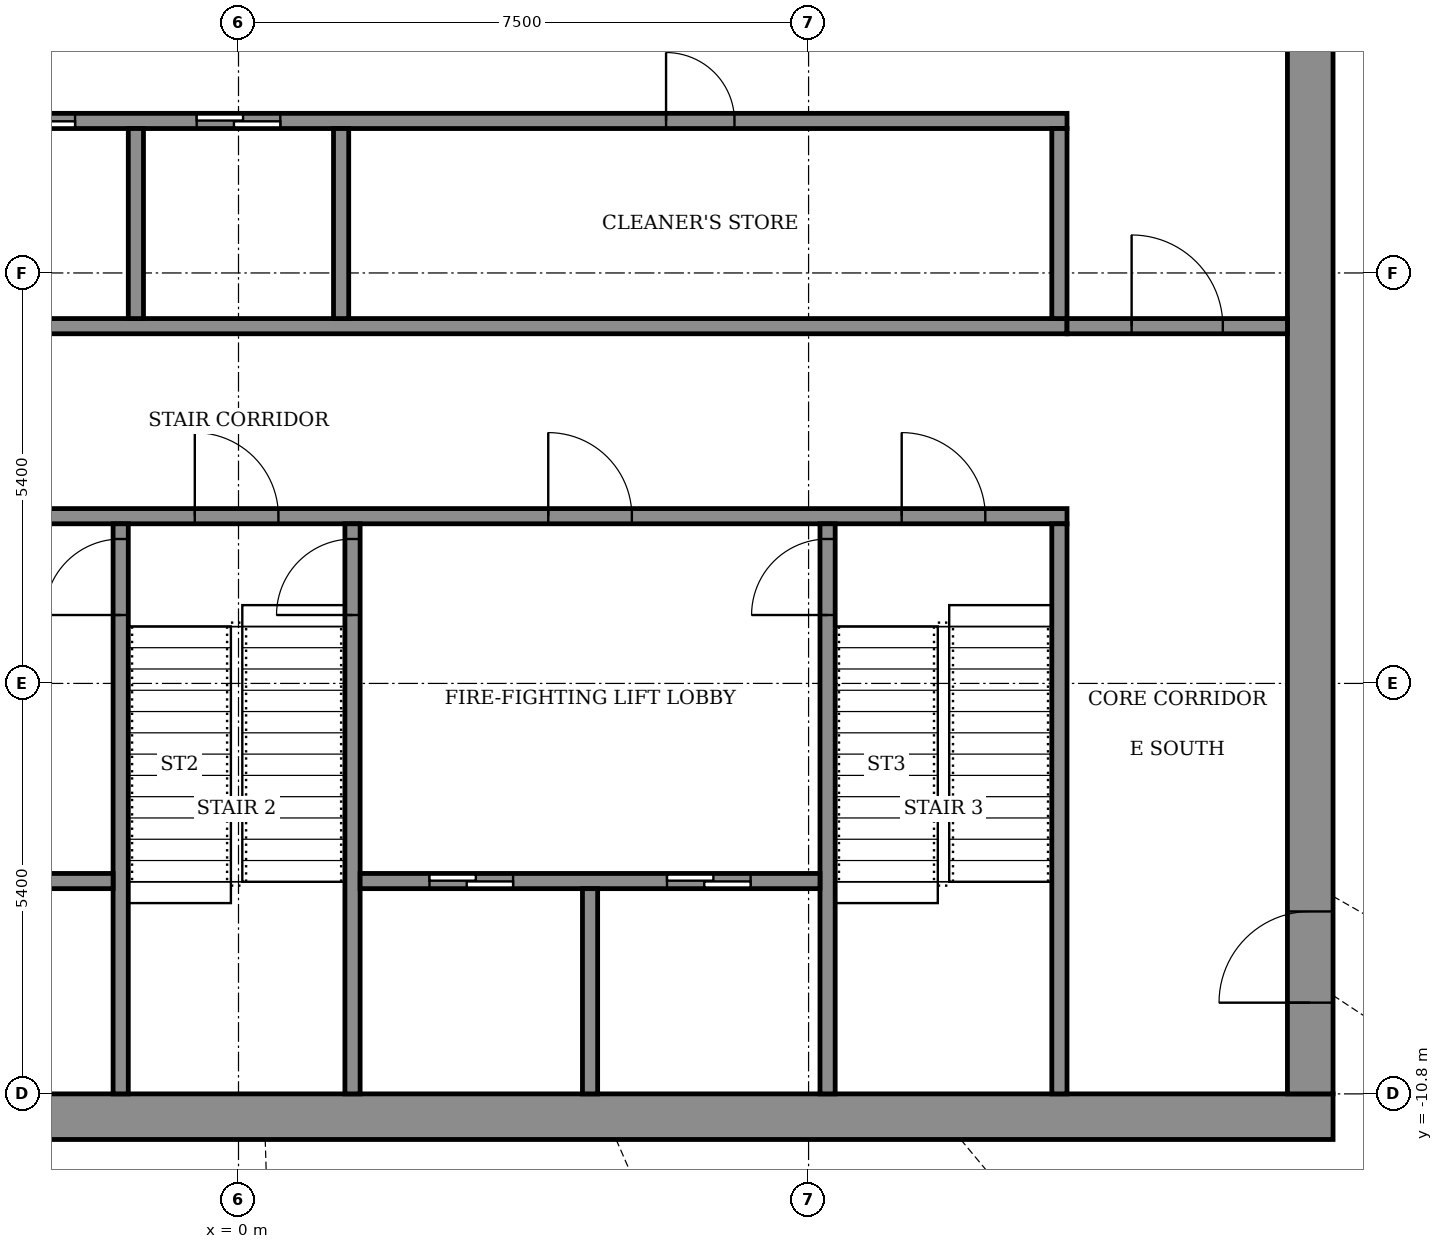
"""IFC4 building model, lengths in metres.
Left out: names, types, materials, properties, quantities, classifications, styles, units other than length and angle.
Written with IfcOpenShell. Run it as: python <this file> out.ifc"""

import sys

from ifc_helpers import new_model, si_unit, direction, frame, frame_2d, origin, place, context, subcontext, project, spatial, rectangle, extrude, element, fill, save


model = new_model("IFC4")
c1 = context("Model", 3, precision=1e-05, world=origin(), true_north=direction((0.0, 1.0)))
c2 = subcontext(c1, "Body", "Model", "MODEL_VIEW")
j1 = project(units=[si_unit("LENGTHUNIT", "METRE"), si_unit("PLANEANGLEUNIT", "RADIAN")], contexts=[c1])
p1 = place(None, origin())
s1 = spatial("IfcSite", under=j1, at=p1, CompositionType="ELEMENT")
p2 = place(p1, origin())
s2 = spatial("IfcBuilding", under=s1, at=p2, CompositionType="ELEMENT")
p3 = place(p2, frame((0.0, 0.0, 337.9)))
s3 = spatial("IfcBuildingStorey", under=s2, at=p3, CompositionType="ELEMENT", Elevation=337.9)
p4 = place(p3, frame((-14.4, -11.1, 0.0), z_axis=(0.0, 0.0, 1.0), x_axis=(1.0, 0.0, 0.0)))
e1 = element("IfcWall", 1, at=p4, inside=s3, PredefinedType="SHEAR", context=c2, shape_type="SweptSolid", body=[
    extrude(rectangle(XDim=28.8, YDim=0.6, at=frame_2d((14.4, 0.0))), origin(), (0.0, 0.0, 1.0), 4.6),
])
p5 = place(p3, frame((14.1, -10.8, 0.0), z_axis=(0.0, 0.0, 1.0), x_axis=(0.0, 1.0, 0.0)))
e2 = element("IfcWall", 2, at=p5, inside=s3, PredefinedType="SHEAR", context=c2, shape_type="SweptSolid", body=[
    extrude(rectangle(XDim=21.6, YDim=0.6, at=frame_2d((10.8, 0.0))), origin(), (0.0, 0.0, 1.0), 4.6),
])
p6 = place(p5, frame((1.2, 0.0, 0.0)))
e3 = element("IfcOpeningElement", 3, at=p6, cuts=e2, PredefinedType="OPENING", context=c2, shape_type="SweptSolid", body=[
    extrude(rectangle(XDim=1.2, YDim=2.1, at=frame_2d((0.6, 1.05))), frame((0.0, 0.31, 0.0), z_axis=(0.0, -1.0, 0.0), x_axis=(1.0, 0.0, 0.0)), (0.0, 0.0, 1.0), 0.62),
])
p7 = place(p3, frame((-10.9, -3.2, 0.0), z_axis=(0.0, 0.0, 1.0), x_axis=(1.0, 0.0, 0.0)))
e4 = element("IfcWall", 4, at=p7, inside=s3, PredefinedType="SHEAR", context=c2, shape_type="SweptSolid", body=[
    extrude(rectangle(XDim=21.8, YDim=0.2, at=frame_2d((10.9, 0.0))), origin(), (0.0, 0.0, 1.0), 4.05),
])
p8 = place(p7, frame((1.075, 0.0, 0.0)))
e5 = element("IfcOpeningElement", 5, at=p8, cuts=e4, PredefinedType="OPENING", context=c2, shape_type="SweptSolid", body=[
    extrude(rectangle(XDim=1.1, YDim=2.1, at=frame_2d((0.55, 1.05))), frame((0.0, 0.11, 0.0), z_axis=(0.0, -1.0, 0.0), x_axis=(1.0, 0.0, 0.0)), (0.0, 0.0, 1.0), 0.22),
])
p9 = place(p7, frame((10.325, 0.0, 0.0)))
e6 = element("IfcOpeningElement", 6, at=p9, cuts=e4, PredefinedType="OPENING", context=c2, shape_type="SweptSolid", body=[
    extrude(rectangle(XDim=1.1, YDim=2.1, at=frame_2d((0.55, 1.05))), frame((0.0, 0.11, 0.0), z_axis=(0.0, -1.0, 0.0), x_axis=(1.0, 0.0, 0.0)), (0.0, 0.0, 1.0), 0.22),
])
p10 = place(p7, frame((19.625, 0.0, 0.0)))
e7 = element("IfcOpeningElement", 7, at=p10, cuts=e4, PredefinedType="OPENING", context=c2, shape_type="SweptSolid", body=[
    extrude(rectangle(XDim=1.1, YDim=2.1, at=frame_2d((0.55, 1.05))), frame((0.0, 0.11, 0.0), z_axis=(0.0, -1.0, 0.0), x_axis=(1.0, 0.0, 0.0)), (0.0, 0.0, 1.0), 0.22),
])
p11 = place(p7, frame((5.7, 0.0, 0.0)))
e8 = element("IfcOpeningElement", 8, at=p11, cuts=e4, PredefinedType="OPENING", context=c2, shape_type="SweptSolid", body=[
    extrude(rectangle(XDim=1.1, YDim=2.1, at=frame_2d((0.55, 1.05))), frame((0.0, 0.11, 0.0), z_axis=(0.0, -1.0, 0.0), x_axis=(1.0, 0.0, 0.0)), (0.0, 0.0, 1.0), 0.22),
])
p12 = place(p7, frame((14.975, 0.0, 0.0)))
e9 = element("IfcOpeningElement", 9, at=p12, cuts=e4, PredefinedType="OPENING", context=c2, shape_type="SweptSolid", body=[
    extrude(rectangle(XDim=1.1, YDim=2.1, at=frame_2d((0.55, 1.05))), frame((0.0, 0.11, 0.0), z_axis=(0.0, -1.0, 0.0), x_axis=(1.0, 0.0, 0.0)), (0.0, 0.0, 1.0), 0.22),
])
p13 = place(p3, frame((-10.9, -0.7, 0.0), z_axis=(0.0, 0.0, 1.0), x_axis=(1.0, 0.0, 0.0)))
e10 = element("IfcWall", 10, at=p13, inside=s3, PredefinedType="SHEAR", context=c2, shape_type="SweptSolid", body=[
    extrude(rectangle(XDim=21.8, YDim=0.2, at=frame_2d((10.9, 0.0))), origin(), (0.0, 0.0, 1.0), 4.05),
])
p14 = place(p3, frame((-10.9, 2.0, 0.0), z_axis=(0.0, 0.0, 1.0), x_axis=(1.0, 0.0, 0.0)))
e11 = element("IfcWall", 11, at=p14, inside=s3, PredefinedType="SHEAR", context=c2, shape_type="SweptSolid", body=[
    extrude(rectangle(XDim=21.8, YDim=0.2, at=frame_2d((10.9, 0.0))), origin(), (0.0, 0.0, 1.0), 4.05),
])
p15 = place(p14, frame((4.95, 0.0, 0.0)))
e12 = element("IfcOpeningElement", 12, at=p15, cuts=e11, PredefinedType="OPENING", context=c2, shape_type="SweptSolid", body=[
    extrude(rectangle(XDim=1.1, YDim=2.1, at=frame_2d((0.55, 1.05))), frame((0.0, 0.11, 0.0), z_axis=(0.0, -1.0, 0.0), x_axis=(1.0, 0.0, 0.0)), (0.0, 0.0, 1.0), 0.22),
])
p16 = place(p14, frame((7.65, 0.0, 0.0)))
e13 = element("IfcOpeningElement", 13, at=p16, cuts=e11, PredefinedType="OPENING", context=c2, shape_type="SweptSolid", body=[
    extrude(rectangle(XDim=1.1, YDim=2.1, at=frame_2d((0.55, 1.05))), frame((0.0, 0.11, 0.0), z_axis=(0.0, -1.0, 0.0), x_axis=(1.0, 0.0, 0.0)), (0.0, 0.0, 1.0), 0.22),
])
p17 = place(p14, frame((10.35, 0.0, 0.0)))
e14 = element("IfcOpeningElement", 14, at=p17, cuts=e11, PredefinedType="OPENING", context=c2, shape_type="SweptSolid", body=[
    extrude(rectangle(XDim=1.1, YDim=2.1, at=frame_2d((0.55, 1.05))), frame((0.0, 0.11, 0.0), z_axis=(0.0, -1.0, 0.0), x_axis=(1.0, 0.0, 0.0)), (0.0, 0.0, 1.0), 0.22),
])
p18 = place(p14, frame((1.675, 0.0, 0.0)))
e15 = element("IfcOpeningElement", 15, at=p18, cuts=e11, PredefinedType="OPENING", context=c2, shape_type="SweptSolid", body=[
    extrude(rectangle(XDim=0.9, YDim=2.1, at=frame_2d((0.45, 1.05))), frame((0.0, 0.11, 0.0), z_axis=(0.0, -1.0, 0.0), x_axis=(1.0, 0.0, 0.0)), (0.0, 0.0, 1.0), 0.22),
])
p19 = place(p14, frame((16.525, 0.0, 0.0)))
e16 = element("IfcOpeningElement", 16, at=p19, cuts=e11, PredefinedType="OPENING", context=c2, shape_type="SweptSolid", body=[
    extrude(rectangle(XDim=0.9, YDim=2.1, at=frame_2d((0.45, 1.05))), frame((0.0, 0.11, 0.0), z_axis=(0.0, -1.0, 0.0), x_axis=(1.0, 0.0, 0.0)), (0.0, 0.0, 1.0), 0.22),
])
p20 = place(p3, frame((-1.55, -10.8, 0.0), z_axis=(0.0, 0.0, 1.0), x_axis=(0.0, 1.0, 0.0)))
e17 = element("IfcWall", 17, at=p20, inside=s3, PredefinedType="SHEAR", context=c2, shape_type="SweptSolid", body=[
    extrude(rectangle(XDim=7.5, YDim=0.2, at=frame_2d((3.75, 0.0))), origin(), (0.0, 0.0, 1.0), 4.05),
])
p21 = place(p20, frame((6.3, 0.0, 0.0)))
e18 = element("IfcOpeningElement", 18, at=p21, cuts=e17, PredefinedType="OPENING", context=c2, shape_type="SweptSolid", body=[
    extrude(rectangle(XDim=1.0, YDim=2.1, at=frame_2d((0.5, 1.05))), frame((0.0, 0.11, 0.0), z_axis=(0.0, -1.0, 0.0), x_axis=(1.0, 0.0, 0.0)), (0.0, 0.0, 1.0), 0.22),
])
p22 = place(p3, frame((1.5, -10.8, 0.0), z_axis=(0.0, 0.0, 1.0), x_axis=(0.0, 1.0, 0.0)))
e19 = element("IfcWall", 19, at=p22, inside=s3, PredefinedType="SHEAR", context=c2, shape_type="SweptSolid", body=[
    extrude(rectangle(XDim=7.5, YDim=0.2, at=frame_2d((3.75, 0.0))), origin(), (0.0, 0.0, 1.0), 4.05),
])
p23 = place(p22, frame((6.3, 0.0, 0.0)))
e20 = element("IfcOpeningElement", 20, at=p23, cuts=e19, PredefinedType="OPENING", context=c2, shape_type="SweptSolid", body=[
    extrude(rectangle(XDim=1.0, YDim=2.1, at=frame_2d((0.5, 1.05))), frame((0.0, 0.11, 0.0), z_axis=(0.0, -1.0, 0.0), x_axis=(1.0, 0.0, 0.0)), (0.0, 0.0, 1.0), 0.22),
])
p24 = place(p3, frame((7.75, -10.8, 0.0), z_axis=(0.0, 0.0, 1.0), x_axis=(0.0, 1.0, 0.0)))
e21 = element("IfcWall", 21, at=p24, inside=s3, PredefinedType="SHEAR", context=c2, shape_type="SweptSolid", body=[
    extrude(rectangle(XDim=7.5, YDim=0.2, at=frame_2d((3.75, 0.0))), origin(), (0.0, 0.0, 1.0), 4.05),
])
p25 = place(p24, frame((6.3, 0.0, 0.0)))
e22 = element("IfcOpeningElement", 22, at=p25, cuts=e21, PredefinedType="OPENING", context=c2, shape_type="SweptSolid", body=[
    extrude(rectangle(XDim=1.0, YDim=2.1, at=frame_2d((0.5, 1.05))), frame((0.0, 0.11, 0.0), z_axis=(0.0, -1.0, 0.0), x_axis=(1.0, 0.0, 0.0)), (0.0, 0.0, 1.0), 0.22),
])
p26 = place(p3, frame((10.8, -10.8, 0.0), z_axis=(0.0, 0.0, 1.0), x_axis=(0.0, 1.0, 0.0)))
e23 = element("IfcWall", 23, at=p26, inside=s3, PredefinedType="SHEAR", context=c2, shape_type="SweptSolid", body=[
    extrude(rectangle(XDim=7.5, YDim=0.2, at=frame_2d((3.75, 0.0))), origin(), (0.0, 0.0, 1.0), 4.05),
])
p27 = place(p3, frame((-7.65, -8.0, 0.0), z_axis=(0.0, 0.0, 1.0), x_axis=(1.0, 0.0, 0.0)))
e24 = element("IfcWall", 24, at=p27, inside=s3, PredefinedType="SHEAR", context=c2, shape_type="SweptSolid", body=[
    extrude(rectangle(XDim=6.0, YDim=0.2, at=frame_2d((3.0, 0.0))), origin(), (0.0, 0.0, 1.0), 4.05),
])
p28 = place(p27, frame((0.9, 0.0, 0.0)))
e25 = element("IfcOpeningElement", 25, at=p28, cuts=e24, PredefinedType="OPENING", context=c2, shape_type="SweptSolid", body=[
    extrude(rectangle(XDim=1.1, YDim=2.1, at=frame_2d((0.55, 1.05))), frame((0.0, 0.11, 0.0), z_axis=(0.0, -1.0, 0.0), x_axis=(1.0, 0.0, 0.0)), (0.0, 0.0, 1.0), 0.22),
])
p29 = place(p27, frame((4.0, 0.0, 0.0)))
e26 = element("IfcOpeningElement", 26, at=p29, cuts=e24, PredefinedType="OPENING", context=c2, shape_type="SweptSolid", body=[
    extrude(rectangle(XDim=1.1, YDim=2.1, at=frame_2d((0.55, 1.05))), frame((0.0, 0.11, 0.0), z_axis=(0.0, -1.0, 0.0), x_axis=(1.0, 0.0, 0.0)), (0.0, 0.0, 1.0), 0.22),
])
p30 = place(p3, frame((1.6, -8.0, 0.0), z_axis=(0.0, 0.0, 1.0), x_axis=(1.0, 0.0, 0.0)))
e27 = element("IfcWall", 27, at=p30, inside=s3, PredefinedType="SHEAR", context=c2, shape_type="SweptSolid", body=[
    extrude(rectangle(XDim=6.05, YDim=0.2, at=frame_2d((3.025, 0.0))), origin(), (0.0, 0.0, 1.0), 4.05),
])
p31 = place(p30, frame((0.913, 0.0, 0.0)))
e28 = element("IfcOpeningElement", 28, at=p31, cuts=e27, PredefinedType="OPENING", context=c2, shape_type="SweptSolid", body=[
    extrude(rectangle(XDim=1.1, YDim=2.1, at=frame_2d((0.55, 1.05))), frame((0.0, 0.11, 0.0), z_axis=(0.0, -1.0, 0.0), x_axis=(1.0, 0.0, 0.0)), (0.0, 0.0, 1.0), 0.22),
])
p32 = place(p30, frame((4.038, 0.0, 0.0)))
e29 = element("IfcOpeningElement", 29, at=p32, cuts=e27, PredefinedType="OPENING", context=c2, shape_type="SweptSolid", body=[
    extrude(rectangle(XDim=1.1, YDim=2.1, at=frame_2d((0.55, 1.05))), frame((0.0, 0.11, 0.0), z_axis=(0.0, -1.0, 0.0), x_axis=(1.0, 0.0, 0.0)), (0.0, 0.0, 1.0), 0.22),
])
p33 = place(p3, frame((4.625, -10.8, 0.0), z_axis=(0.0, 0.0, 1.0), x_axis=(0.0, 1.0, 0.0)))
e30 = element("IfcWall", 30, at=p33, inside=s3, PredefinedType="SHEAR", context=c2, shape_type="SweptSolid", body=[
    extrude(rectangle(XDim=2.7, YDim=0.2, at=frame_2d((1.35, 0.0))), origin(), (0.0, 0.0, 1.0), 4.05),
])
for number, where, z_axis, x_axis in (
    (31, (-1.35, -0.6, 0.0), (0.0, 0.0, 1.0), (0.0, 1.0, 0.0)),
    (32, (1.35, -0.6, 0.0), (0.0, 0.0, 1.0), (0.0, 1.0, 0.0)),
):
    element("IfcWall", number, at=place(p3, frame(where, z_axis=z_axis, x_axis=x_axis)), inside=s3, PredefinedType="SHEAR", context=c2, shape_type="SweptSolid", body=[
        extrude(rectangle(XDim=2.5, YDim=0.2, at=frame_2d((1.25, 0.0))), origin(), (0.0, 0.0, 1.0), 4.05),
    ])
p34 = place(p3, frame((10.8, -0.6, 0.0), z_axis=(0.0, 0.0, 1.0), x_axis=(0.0, 1.0, 0.0)))
e33 = element("IfcWall", 33, at=p34, inside=s3, PredefinedType="STANDARD", context=c2, shape_type="SweptSolid", body=[
    extrude(rectangle(XDim=2.5, YDim=0.2, at=frame_2d((1.25, 0.0))), origin(), (0.0, 0.0, 1.0), 4.05),
])
p35 = place(p3, frame((10.9, -0.7, 0.0), z_axis=(0.0, 0.0, 1.0), x_axis=(1.0, 0.0, 0.0)))
e34 = element("IfcWall", 34, at=p35, inside=s3, PredefinedType="STANDARD", context=c2, shape_type="SweptSolid", body=[
    extrude(rectangle(XDim=2.9, YDim=0.2, at=frame_2d((1.45, 0.0))), origin(), (0.0, 0.0, 1.0), 4.05),
])
p36 = place(p35, frame((0.85, 0.0, 0.0)))
e35 = element("IfcOpeningElement", 35, at=p36, cuts=e34, PredefinedType="OPENING", context=c2, shape_type="SweptSolid", body=[
    extrude(rectangle(XDim=1.2, YDim=2.1, at=frame_2d((0.6, 1.05))), frame((0.0, 0.11, 0.0), z_axis=(0.0, -1.0, 0.0), x_axis=(1.0, 0.0, 0.0)), (0.0, 0.0, 1.0), 0.22),
])
p37 = place(p6, origin())
e36 = element("IfcDoor", 36, at=p37, inside=s3, OperationType="DOUBLE_DOOR_SINGLE_SWING", PredefinedType="DOOR", context=c2, shape_type="SweptSolid", body=[
    extrude(rectangle(XDim=1.2, YDim=2.1, at=frame_2d((0.6, 1.05))), frame((0.0, 0.025, 0.0), z_axis=(0.0, -1.0, 0.0), x_axis=(1.0, 0.0, 0.0)), (0.0, 0.0, 1.0), 0.05),
])
fill(e3, e36)
p38 = place(p16, origin())
e37 = element("IfcDoor", 37, at=p38, inside=s3, OperationType="SLIDING_TO_LEFT", PredefinedType="DOOR", context=c2, shape_type="SweptSolid", body=[
    extrude(rectangle(XDim=1.1, YDim=2.1, at=frame_2d((0.55, 1.05))), frame((0.0, 0.025, 0.0), z_axis=(0.0, -1.0, 0.0), x_axis=(1.0, 0.0, 0.0)), (0.0, 0.0, 1.0), 0.05),
])
fill(e13, e37)
p39 = place(p17, origin())
e38 = element("IfcDoor", 38, at=p39, inside=s3, OperationType="SLIDING_TO_LEFT", PredefinedType="DOOR", context=c2, shape_type="SweptSolid", body=[
    extrude(rectangle(XDim=1.1, YDim=2.1, at=frame_2d((0.55, 1.05))), frame((0.0, 0.025, 0.0), z_axis=(0.0, -1.0, 0.0), x_axis=(1.0, 0.0, 0.0)), (0.0, 0.0, 1.0), 0.05),
])
fill(e14, e38)
p40 = place(p19, origin())
e39 = element("IfcDoor", 39, at=p40, inside=s3, OperationType="SINGLE_SWING_RIGHT", PredefinedType="DOOR", context=c2, shape_type="SweptSolid", body=[
    extrude(rectangle(XDim=0.9, YDim=2.1, at=frame_2d((0.45, 1.05))), frame((0.0, 0.025, 0.0), z_axis=(0.0, -1.0, 0.0), x_axis=(1.0, 0.0, 0.0)), (0.0, 0.0, 1.0), 0.05),
])
fill(e16, e39)
p41 = place(p31, origin())
e40 = element("IfcDoor", 40, at=p41, inside=s3, OperationType="SLIDING_TO_LEFT", PredefinedType="DOOR", context=c2, shape_type="SweptSolid", body=[
    extrude(rectangle(XDim=1.1, YDim=2.1, at=frame_2d((0.55, 1.05))), frame((0.0, 0.025, 0.0), z_axis=(0.0, -1.0, 0.0), x_axis=(1.0, 0.0, 0.0)), (0.0, 0.0, 1.0), 0.05),
])
fill(e28, e40)
p42 = place(p32, origin())
e41 = element("IfcDoor", 41, at=p42, inside=s3, OperationType="SLIDING_TO_LEFT", PredefinedType="DOOR", context=c2, shape_type="SweptSolid", body=[
    extrude(rectangle(XDim=1.1, YDim=2.1, at=frame_2d((0.55, 1.05))), frame((0.0, 0.025, 0.0), z_axis=(0.0, -1.0, 0.0), x_axis=(1.0, 0.0, 0.0)), (0.0, 0.0, 1.0), 0.05),
])
fill(e29, e41)
p43 = place(p9, origin())
e42 = element("IfcDoor", 42, at=p43, inside=s3, OperationType="SINGLE_SWING_RIGHT", PredefinedType="DOOR", context=c2, shape_type="SweptSolid", body=[
    extrude(rectangle(XDim=1.1, YDim=2.1, at=frame_2d((0.55, 1.05))), frame((0.0, 0.025, 0.0), z_axis=(0.0, -1.0, 0.0), x_axis=(1.0, 0.0, 0.0)), (0.0, 0.0, 1.0), 0.05),
])
fill(e6, e42)
p44 = place(p10, origin())
e43 = element("IfcDoor", 43, at=p44, inside=s3, OperationType="SINGLE_SWING_RIGHT", PredefinedType="DOOR", context=c2, shape_type="SweptSolid", body=[
    extrude(rectangle(XDim=1.1, YDim=2.1, at=frame_2d((0.55, 1.05))), frame((0.0, 0.025, 0.0), z_axis=(0.0, -1.0, 0.0), x_axis=(1.0, 0.0, 0.0)), (0.0, 0.0, 1.0), 0.05),
])
fill(e7, e43)
p45 = place(p12, origin())
e44 = element("IfcDoor", 44, at=p45, inside=s3, OperationType="SINGLE_SWING_LEFT", PredefinedType="DOOR", context=c2, shape_type="SweptSolid", body=[
    extrude(rectangle(XDim=1.1, YDim=2.1, at=frame_2d((0.55, 1.05))), frame((0.0, 0.025, 0.0), z_axis=(0.0, -1.0, 0.0), x_axis=(1.0, 0.0, 0.0)), (0.0, 0.0, 1.0), 0.05),
])
fill(e9, e44)
p46 = place(p21, origin())
e45 = element("IfcDoor", 45, at=p46, inside=s3, OperationType="SINGLE_SWING_RIGHT", PredefinedType="DOOR", context=c2, shape_type="SweptSolid", body=[
    extrude(rectangle(XDim=1.0, YDim=2.1, at=frame_2d((0.5, 1.05))), frame((0.0, 0.025, 0.0), z_axis=(0.0, -1.0, 0.0), x_axis=(1.0, 0.0, 0.0)), (0.0, 0.0, 1.0), 0.05),
])
fill(e18, e45)
p47 = place(p23, origin())
e46 = element("IfcDoor", 46, at=p47, inside=s3, OperationType="SINGLE_SWING_RIGHT", PredefinedType="DOOR", context=c2, shape_type="SweptSolid", body=[
    extrude(rectangle(XDim=1.0, YDim=2.1, at=frame_2d((0.5, 1.05))), frame((0.0, 0.025, 0.0), z_axis=(0.0, -1.0, 0.0), x_axis=(1.0, 0.0, 0.0)), (0.0, 0.0, 1.0), 0.05),
])
fill(e20, e46)
p48 = place(p25, origin())
e47 = element("IfcDoor", 47, at=p48, inside=s3, OperationType="SINGLE_SWING_RIGHT", PredefinedType="DOOR", context=c2, shape_type="SweptSolid", body=[
    extrude(rectangle(XDim=1.0, YDim=2.1, at=frame_2d((0.5, 1.05))), frame((0.0, 0.025, 0.0), z_axis=(0.0, -1.0, 0.0), x_axis=(1.0, 0.0, 0.0)), (0.0, 0.0, 1.0), 0.05),
])
fill(e22, e47)
p49 = place(p36, origin())
e48 = element("IfcDoor", 48, at=p49, inside=s3, OperationType="SINGLE_SWING_LEFT", PredefinedType="DOOR", context=c2, shape_type="SweptSolid", body=[
    extrude(rectangle(XDim=1.2, YDim=2.1, at=frame_2d((0.6, 1.05))), frame((0.0, 0.025, 0.0), z_axis=(0.0, -1.0, 0.0), x_axis=(1.0, 0.0, 0.0)), (0.0, 0.0, 1.0), 0.05),
])
fill(e35, e48)
save(model, sys.argv[1])
